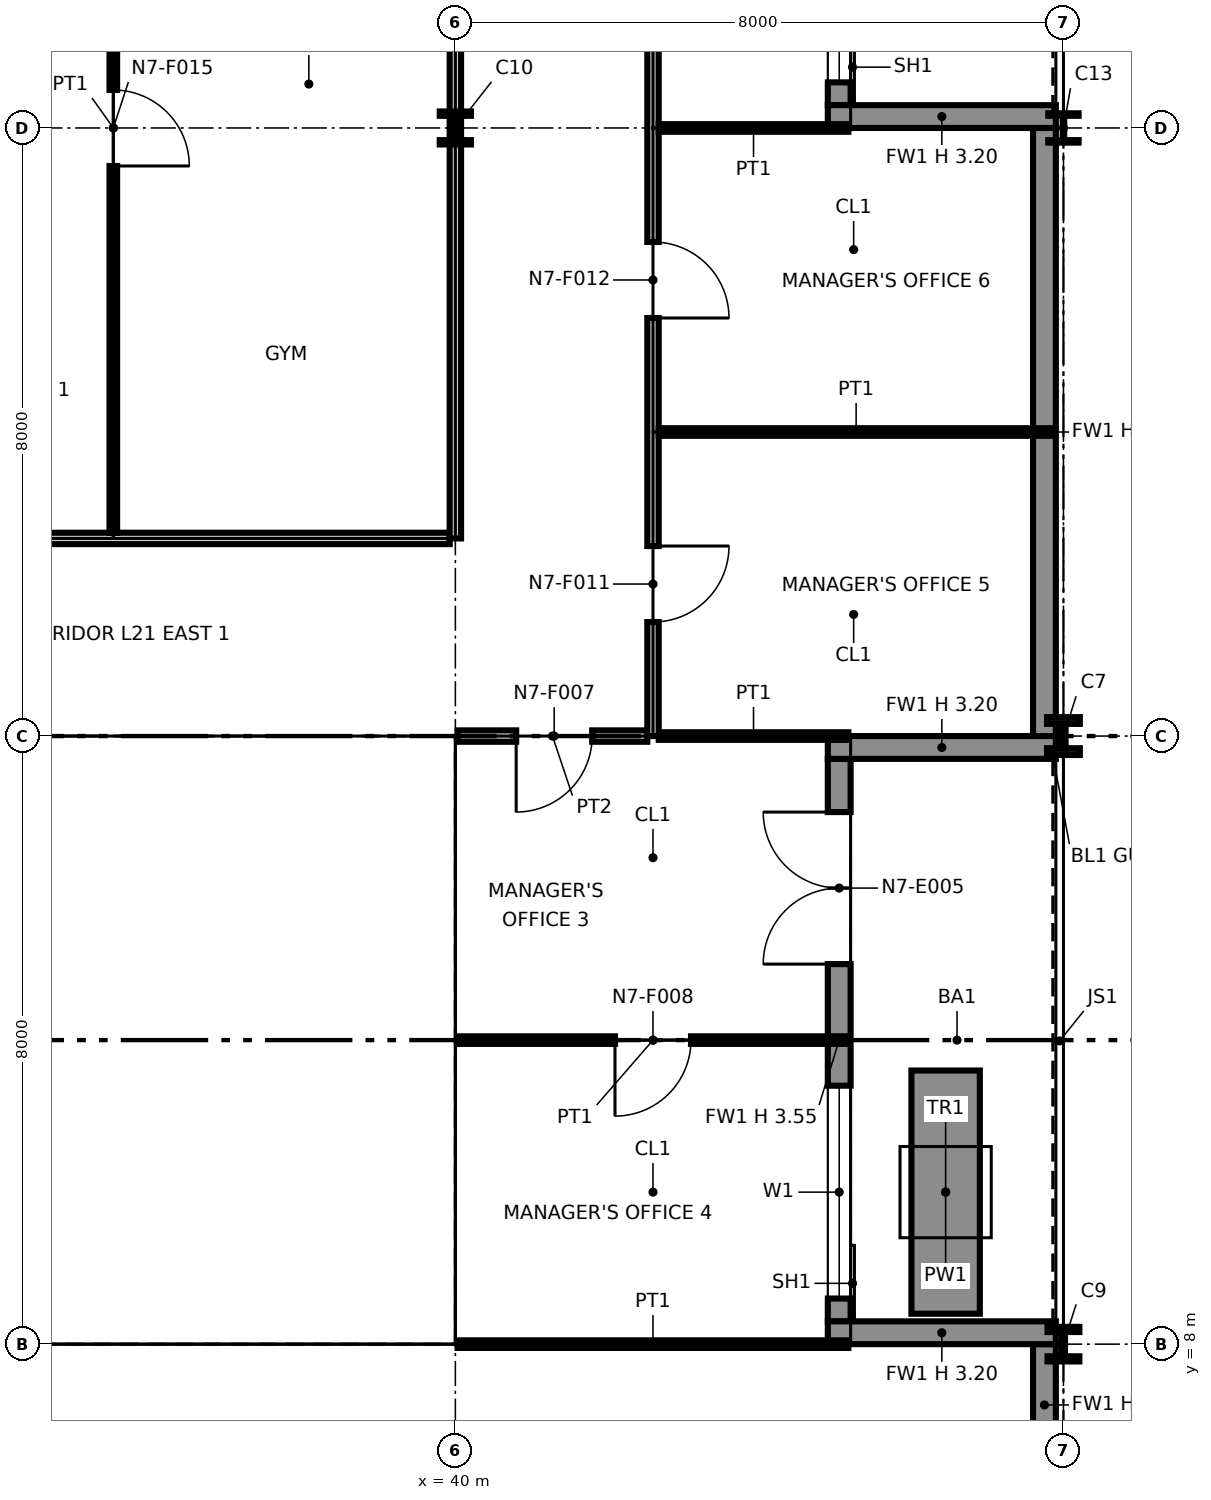
"""IFC4 building model, lengths in metres.
Left out: names, types, materials, properties, quantities, classifications, styles, units other than length and angle.
Written with IfcOpenShell. Run it as: python <this file> out.ifc"""

import sys

from ifc_helpers import new_model, si_unit, direction, frame, frame_2d, origin, origin_2d, place, context, subcontext, project, spatial, polyline, rectangle, i_section, outline, extrude, element, fill, save


model = new_model("IFC4")
c1 = context("Model", 3, precision=1e-05, world=origin(), true_north=direction((0.0, 1.0)))
c2 = subcontext(c1, "Body", "Model", "MODEL_VIEW")
j1 = project(units=[si_unit("LENGTHUNIT", "METRE"), si_unit("PLANEANGLEUNIT", "RADIAN")], contexts=[c1])
p1 = place(None, origin())
s1 = spatial("IfcSite", under=j1, at=p1, CompositionType="ELEMENT")
p2 = place(p1, origin())
s2 = spatial("IfcBuilding", under=s1, at=p2, CompositionType="ELEMENT")
p3 = place(p2, frame((0.0, 0.0, 109.6)))
s3 = spatial("IfcBuildingStorey", under=s2, at=p3, CompositionType="ELEMENT", Elevation=109.6)
for number, where, z_axis, x_axis in (
    (1, (40.0, 8.0, 0.0), (0.0, 0.0, 1.0), (1.0, 0.0, 0.0)),
    (2, (40.0, 16.0, 0.0), (0.0, 0.0, 1.0), (1.0, 0.0, 0.0)),
):
    element("IfcColumn", number, at=place(p3, frame(where, z_axis=z_axis, x_axis=x_axis)), inside=s3, PredefinedType="COLUMN", context=c2, shape_type="SweptSolid", body=[
        extrude(i_section(OverallWidth=0.406, OverallDepth=0.417, WebThickness=0.03, FlangeThickness=0.048, at=origin_2d()), origin(), (0.0, 0.0, 1.0), 4.15),
    ])
p4 = place(p3, frame((40.0, 24.0, 0.0), z_axis=(0.0, 0.0, 1.0), x_axis=(1.0, 0.0, 0.0)))
e3 = element("IfcColumn", 3, at=p4, inside=s3, PredefinedType="COLUMN", context=c2, shape_type="SweptSolid", body=[
    extrude(i_section(OverallWidth=0.411, OverallDepth=0.434, WebThickness=0.036, FlangeThickness=0.057, at=origin_2d()), origin(), (0.0, 0.0, 1.0), 4.15),
])
p5 = place(p3, frame((48.0, 8.0, 0.0), z_axis=(0.0, 0.0, 1.0), x_axis=(1.0, 0.0, 0.0)))
e4 = element("IfcColumn", 4, at=p5, inside=s3, PredefinedType="COLUMN", context=c2, shape_type="SweptSolid", body=[
    extrude(i_section(OverallWidth=0.419, OverallDepth=0.455, WebThickness=0.042, FlangeThickness=0.068, at=origin_2d()), origin(), (0.0, 0.0, 1.0), 4.15),
])
p6 = place(p3, frame((48.0, 16.0, 0.0), z_axis=(0.0, 0.0, 1.0), x_axis=(1.0, 0.0, 0.0)))
e5 = element("IfcColumn", 5, at=p6, inside=s3, PredefinedType="COLUMN", context=c2, shape_type="SweptSolid", body=[
    extrude(i_section(OverallWidth=0.432, OverallDepth=0.498, WebThickness=0.056, FlangeThickness=0.089, at=origin_2d()), origin(), (0.0, 0.0, 1.0), 4.15),
])
p7 = place(p3, frame((48.0, 24.0, 0.0), z_axis=(0.0, 0.0, 1.0), x_axis=(1.0, 0.0, 0.0)))
e6 = element("IfcColumn", 6, at=p7, inside=s3, PredefinedType="COLUMN", context=c2, shape_type="SweptSolid", body=[
    extrude(i_section(OverallWidth=0.399, OverallDepth=0.386, WebThickness=0.021, FlangeThickness=0.033, at=origin_2d()), origin(), (0.0, 0.0, 1.0), 4.15),
])
p8 = place(p3, frame((47.75, 6.4, 0.0), z_axis=(0.0, 0.0, 1.0), x_axis=(0.0, 1.0, 0.0)))
e7 = element("IfcWall", 7, at=p8, inside=s3, PredefinedType="SOLIDWALL", context=c2, shape_type="SweptSolid", body=[
    extrude(rectangle(XDim=1.6, YDim=0.3, at=frame_2d((0.8, 0.0))), origin(), (0.0, 0.0, 1.0), 3.199),
])
p9 = place(p3, frame((45.05, 8.3, 0.0), z_axis=(0.0, 0.0, 1.0), x_axis=(0.0, 1.0, 0.0)))
e8 = element("IfcWall", 8, at=p9, inside=s3, PredefinedType="SOLIDWALL", context=c2, shape_type="SweptSolid", body=[
    extrude(rectangle(XDim=7.4, YDim=0.3, at=frame_2d((3.7, 0.0))), origin(), (0.0, 0.0, 1.0), 3.547),
])
p10 = place(p9, frame((0.3, 0.0, 0.9)))
e9 = element("IfcOpeningElement", 9, at=p10, cuts=e8, PredefinedType="OPENING", context=c2, shape_type="SweptSolid", body=[
    extrude(rectangle(XDim=2.8, YDim=2.2, at=frame_2d((1.4, 1.1))), frame((0.0, 0.16, 0.0), z_axis=(0.0, -1.0, 0.0), x_axis=(1.0, 0.0, 0.0)), (0.0, 0.0, 1.0), 0.32),
])
p11 = place(p9, frame((4.7, 0.0, 0.0)))
e10 = element("IfcOpeningElement", 10, at=p11, cuts=e8, PredefinedType="OPENING", context=c2, shape_type="SweptSolid", body=[
    extrude(rectangle(XDim=2.0, YDim=2.4, at=frame_2d((1.0, 1.2))), frame((0.0, 0.16, 0.0), z_axis=(0.0, -1.0, 0.0), x_axis=(1.0, 0.0, 0.0)), (0.0, 0.0, 1.0), 0.32),
])
for number, where, z_axis, x_axis in (
    (11, (47.9, 8.15, 0.0), (0.0, 0.0, 1.0), (-1.0, 0.0, 0.0)),
    (12, (47.9, 15.85, 0.0), (0.0, 0.0, 1.0), (-1.0, 0.0, 0.0)),
):
    element("IfcWall", number, at=place(p3, frame(where, z_axis=z_axis, x_axis=x_axis)), inside=s3, PredefinedType="SOLIDWALL", context=c2, shape_type="SweptSolid", body=[
        extrude(rectangle(XDim=3.0, YDim=0.3, at=frame_2d((1.5, 0.0))), origin(), (0.0, 0.0, 1.0), 3.199),
    ])
p12 = place(p3, frame((47.75, 16.0, 0.0), z_axis=(0.0, 0.0, 1.0), x_axis=(0.0, 1.0, 0.0)))
e13 = element("IfcWall", 13, at=p12, inside=s3, PredefinedType="SOLIDWALL", context=c2, shape_type="SweptSolid", body=[
    extrude(rectangle(XDim=8.0, YDim=0.3, at=frame_2d((4.0, 0.0))), origin(), (0.0, 0.0, 1.0), 3.199),
])
p13 = place(p3, frame((45.05, 24.3, 0.0), z_axis=(0.0, 0.0, 1.0), x_axis=(0.0, 1.0, 0.0)))
e14 = element("IfcWall", 14, at=p13, inside=s3, PredefinedType="SOLIDWALL", context=c2, shape_type="SweptSolid", body=[
    extrude(rectangle(XDim=7.4, YDim=0.3, at=frame_2d((3.7, 0.0))), origin(), (0.0, 0.0, 1.0), 3.547),
])
p14 = place(p13, frame((0.3, 0.0, 0.9)))
e15 = element("IfcOpeningElement", 15, at=p14, cuts=e14, PredefinedType="OPENING", context=c2, shape_type="SweptSolid", body=[
    extrude(rectangle(XDim=2.8, YDim=2.2, at=frame_2d((1.4, 1.1))), frame((0.0, 0.16, 0.0), z_axis=(0.0, -1.0, 0.0), x_axis=(1.0, 0.0, 0.0)), (0.0, 0.0, 1.0), 0.32),
])
p15 = place(p13, frame((4.7, 0.0, 0.0)))
e16 = element("IfcOpeningElement", 16, at=p15, cuts=e14, PredefinedType="OPENING", context=c2, shape_type="SweptSolid", body=[
    extrude(rectangle(XDim=2.0, YDim=2.4, at=frame_2d((1.0, 1.2))), frame((0.0, 0.16, 0.0), z_axis=(0.0, -1.0, 0.0), x_axis=(1.0, 0.0, 0.0)), (0.0, 0.0, 1.0), 0.32),
])
p16 = place(p3, frame((47.9, 24.15, 0.0), z_axis=(0.0, 0.0, 1.0), x_axis=(-1.0, 0.0, 0.0)))
e17 = element("IfcWall", 17, at=p16, inside=s3, PredefinedType="SOLIDWALL", context=c2, shape_type="SweptSolid", body=[
    extrude(rectangle(XDim=3.0, YDim=0.3, at=frame_2d((1.5, 0.0))), origin(), (0.0, 0.0, 1.0), 3.199),
])
p17 = place(p3, frame((46.45, 8.4, 0.0), z_axis=(0.0, 0.0, 1.0), x_axis=(0.0, 1.0, 0.0)))
e18 = element("IfcWall", 18, at=p17, inside=s3, PredefinedType="SOLIDWALL", context=c2, shape_type="SweptSolid", body=[
    extrude(rectangle(XDim=3.2, YDim=0.9, at=frame_2d((1.6, 0.0))), origin(), (0.0, 0.0, 1.0), 0.6),
])
p18 = place(p3, frame((24.65, 8.75, 0.0), z_axis=(0.0, 0.0, 1.0), x_axis=(1.0, 0.0, 0.0)))
e19 = element("IfcWall", 19, at=p18, inside=s3, PredefinedType="PARTITIONING", context=c2, shape_type="SweptSolid", body=[
    extrude(outline(polyline([(0.0, 0.0), (14.7, 0.0), (14.7, 4.15), (7.489, 4.15), (7.488, 3.382), (7.212, 3.382), (7.211, 4.15), (0.0, 4.15), (0.0, 0.0)])), frame((0.0, 0.1, 0.0), z_axis=(0.0, -1.0, 0.0), x_axis=(1.0, 0.0, 0.0)), (0.0, 0.0, 1.0), 0.2),
])
p19 = place(p3, frame((24.65, 15.25, 0.0), z_axis=(0.0, 0.0, 1.0), x_axis=(1.0, 0.0, 0.0)))
e20 = element("IfcWall", 20, at=p19, inside=s3, PredefinedType="PARTITIONING", context=c2, shape_type="SweptSolid", body=[
    extrude(outline(polyline([(0.0, 0.0), (14.7, 0.0), (14.7, 4.15), (7.489, 4.15), (7.488, 3.382), (7.212, 3.382), (7.211, 4.15), (0.0, 4.15), (0.0, 0.0)])), frame((0.0, 0.1, 0.0), z_axis=(0.0, -1.0, 0.0), x_axis=(1.0, 0.0, 0.0)), (0.0, 0.0, 1.0), 0.2),
])
p20 = place(p19, frame((2.85, 0.0, 0.0)))
e21 = element("IfcOpeningElement", 21, at=p20, cuts=e20, PredefinedType="OPENING", context=c2, shape_type="SweptSolid", body=[
    extrude(rectangle(XDim=1.8, YDim=2.1, at=frame_2d((0.9, 1.05))), frame((0.0, 0.11, 0.0), z_axis=(0.0, -1.0, 0.0), x_axis=(1.0, 0.0, 0.0)), (0.0, 0.0, 1.0), 0.22),
])
p21 = place(p19, frame((9.95, 0.0, 0.0), z_axis=(0.0, 0.0, 1.0), x_axis=(-1.0, 0.0, 0.0)))
e22 = element("IfcOpeningElement", 22, at=p21, cuts=e20, PredefinedType="OPENING", context=c2, shape_type="SweptSolid", body=[
    extrude(rectangle(XDim=1.4, YDim=2.1, at=frame_2d((0.7, 1.05))), frame((0.0, 0.11, 0.0), z_axis=(0.0, -1.0, 0.0), x_axis=(1.0, 0.0, 0.0)), (0.0, 0.0, 1.0), 0.22),
])
p22 = place(p19, frame((13.4, 0.0, 0.0), z_axis=(0.0, 0.0, 1.0), x_axis=(-1.0, 0.0, 0.0)))
e23 = element("IfcOpeningElement", 23, at=p22, cuts=e20, PredefinedType="OPENING", context=c2, shape_type="SweptSolid", body=[
    extrude(rectangle(XDim=1.4, YDim=2.1, at=frame_2d((0.7, 1.05))), frame((0.0, 0.11, 0.0), z_axis=(0.0, -1.0, 0.0), x_axis=(1.0, 0.0, 0.0)), (0.0, 0.0, 1.0), 0.22),
])
for number, where, z_axis, x_axis in (
    (24, (35.6, 8.85, 0.0), (0.0, 0.0, 1.0), (0.0, 1.0, 0.0)),
    (25, (39.25, 8.85, 0.0), (0.0, 0.0, 1.0), (0.0, 1.0, 0.0)),
):
    element("IfcWall", number, at=place(p3, frame(where, z_axis=z_axis, x_axis=x_axis)), inside=s3, PredefinedType="PARTITIONING", context=c2, shape_type="SweptSolid", body=[
        extrude(rectangle(XDim=6.3, YDim=0.2, at=frame_2d((3.15, 0.0))), origin(), (0.0, 0.0, 1.0), 4.15),
    ])
p23 = place(p3, frame((40.03, 8.0, 0.0), z_axis=(0.0, 0.0, 1.0), x_axis=(1.0, 0.0, 0.0)))
e26 = element("IfcWall", 26, at=p23, inside=s3, PredefinedType="PARTITIONING", context=c2, shape_type="SweptSolid", body=[
    extrude(rectangle(XDim=5.14, YDim=0.1, at=frame_2d((2.57, 0.0))), origin(), (0.0, 0.0, 1.0), 3.194),
])
p24 = place(p3, frame((40.03, 12.0, 0.0), z_axis=(0.0, 0.0, 1.0), x_axis=(1.0, 0.0, 0.0)))
e27 = element("IfcWall", 27, at=p24, inside=s3, PredefinedType="PARTITIONING", context=c2, shape_type="SweptSolid", body=[
    extrude(rectangle(XDim=5.14, YDim=0.1, at=frame_2d((2.57, 0.0))), origin(), (0.0, 0.0, 1.0), 3.194),
])
p25 = place(p24, frame((3.07, 0.0, 0.0), z_axis=(0.0, 0.0, 1.0), x_axis=(-1.0, 0.0, 0.0)))
e28 = element("IfcOpeningElement", 28, at=p25, cuts=e27, PredefinedType="OPENING", context=c2, shape_type="SweptSolid", body=[
    extrude(rectangle(XDim=1.0, YDim=2.1, at=frame_2d((0.5, 1.05))), frame((0.0, 0.06, 0.0), z_axis=(0.0, -1.0, 0.0), x_axis=(1.0, 0.0, 0.0)), (0.0, 0.0, 1.0), 0.12),
])
p26 = place(p3, frame((40.03, 16.0, 0.0), z_axis=(0.0, 0.0, 1.0), x_axis=(1.0, 0.0, 0.0)))
e29 = element("IfcWall", 29, at=p26, inside=s3, PredefinedType="PARTITIONING", context=c2, shape_type="SweptSolid", body=[
    extrude(rectangle(XDim=2.495, YDim=0.15, at=frame_2d((1.248, 0.0))), origin(), (0.0, 0.0, 1.0), 3.194),
])
p27 = place(p26, frame((1.77, 0.0, 0.0), z_axis=(0.0, 0.0, 1.0), x_axis=(-1.0, 0.0, 0.0)))
e30 = element("IfcOpeningElement", 30, at=p27, cuts=e29, PredefinedType="OPENING", context=c2, shape_type="SweptSolid", body=[
    extrude(rectangle(XDim=1.0, YDim=2.1, at=frame_2d((0.5, 1.05))), frame((0.0, 0.085, 0.0), z_axis=(0.0, -1.0, 0.0), x_axis=(1.0, 0.0, 0.0)), (0.0, 0.0, 1.0), 0.17),
])
p28 = place(p3, frame((42.675, 16.0, 0.0), z_axis=(0.0, 0.0, 1.0), x_axis=(1.0, 0.0, 0.0)))
e31 = element("IfcWall", 31, at=p28, inside=s3, PredefinedType="PARTITIONING", context=c2, shape_type="SweptSolid", body=[
    extrude(rectangle(XDim=2.495, YDim=0.1, at=frame_2d((1.248, 0.0))), origin(), (0.0, 0.0, 1.0), 3.194),
])
p29 = place(p3, frame((42.6, 16.0, 0.0), z_axis=(0.0, 0.0, 1.0), x_axis=(0.0, 1.0, 0.0)))
e32 = element("IfcWall", 32, at=p29, inside=s3, PredefinedType="PARTITIONING", context=c2, shape_type="SweptSolid", body=[
    extrude(rectangle(XDim=26.525, YDim=0.15, at=frame_2d((13.262, 0.0))), origin(), (0.0, 0.0, 1.0), 3.194),
])
p30 = place(p29, frame((2.5, 0.0, 0.0), z_axis=(0.0, 0.0, 1.0), x_axis=(-1.0, 0.0, 0.0)))
e33 = element("IfcOpeningElement", 33, at=p30, cuts=e32, PredefinedType="OPENING", context=c2, shape_type="SweptSolid", body=[
    extrude(rectangle(XDim=1.0, YDim=2.1, at=frame_2d((0.5, 1.05))), frame((0.0, 0.085, 0.0), z_axis=(0.0, -1.0, 0.0), x_axis=(1.0, 0.0, 0.0)), (0.0, 0.0, 1.0), 0.17),
])
p31 = place(p29, frame((6.5, 0.0, 0.0), z_axis=(0.0, 0.0, 1.0), x_axis=(-1.0, 0.0, 0.0)))
e34 = element("IfcOpeningElement", 34, at=p31, cuts=e32, PredefinedType="OPENING", context=c2, shape_type="SweptSolid", body=[
    extrude(rectangle(XDim=1.0, YDim=2.1, at=frame_2d((0.5, 1.05))), frame((0.0, 0.085, 0.0), z_axis=(0.0, -1.0, 0.0), x_axis=(1.0, 0.0, 0.0)), (0.0, 0.0, 1.0), 0.17),
])
p32 = place(p29, frame((12.5, 0.0, 0.0), z_axis=(0.0, 0.0, 1.0), x_axis=(-1.0, 0.0, 0.0)))
e35 = element("IfcOpeningElement", 35, at=p32, cuts=e32, PredefinedType="OPENING", context=c2, shape_type="SweptSolid", body=[
    extrude(rectangle(XDim=1.0, YDim=2.1, at=frame_2d((0.5, 1.05))), frame((0.0, 0.085, 0.0), z_axis=(0.0, -1.0, 0.0), x_axis=(1.0, 0.0, 0.0)), (0.0, 0.0, 1.0), 0.17),
])
p33 = place(p29, frame((18.5, 0.0, 0.0), z_axis=(0.0, 0.0, 1.0), x_axis=(-1.0, 0.0, 0.0)))
e36 = element("IfcOpeningElement", 36, at=p33, cuts=e32, PredefinedType="OPENING", context=c2, shape_type="SweptSolid", body=[
    extrude(rectangle(XDim=1.0, YDim=2.1, at=frame_2d((0.5, 1.05))), frame((0.0, 0.085, 0.0), z_axis=(0.0, -1.0, 0.0), x_axis=(1.0, 0.0, 0.0)), (0.0, 0.0, 1.0), 0.17),
])
p34 = place(p29, frame((22.5, 0.0, 0.0), z_axis=(0.0, 0.0, 1.0), x_axis=(-1.0, 0.0, 0.0)))
e37 = element("IfcOpeningElement", 37, at=p34, cuts=e32, PredefinedType="OPENING", context=c2, shape_type="SweptSolid", body=[
    extrude(rectangle(XDim=1.0, YDim=2.1, at=frame_2d((0.5, 1.05))), frame((0.0, 0.085, 0.0), z_axis=(0.0, -1.0, 0.0), x_axis=(1.0, 0.0, 0.0)), (0.0, 0.0, 1.0), 0.17),
])
p35 = place(p29, frame((25.8, 0.0, 0.0), z_axis=(0.0, 0.0, 1.0), x_axis=(-1.0, 0.0, 0.0)))
e38 = element("IfcOpeningElement", 38, at=p35, cuts=e32, PredefinedType="OPENING", context=c2, shape_type="SweptSolid", body=[
    extrude(rectangle(XDim=1.0, YDim=2.1, at=frame_2d((0.5, 1.05))), frame((0.0, 0.085, 0.0), z_axis=(0.0, -1.0, 0.0), x_axis=(1.0, 0.0, 0.0)), (0.0, 0.0, 1.0), 0.17),
])
p36 = place(p3, frame((26.675, 18.6, 0.0), z_axis=(0.0, 0.0, 1.0), x_axis=(1.0, 0.0, 0.0)))
e39 = element("IfcWall", 39, at=p36, inside=s3, PredefinedType="PARTITIONING", context=c2, shape_type="SweptSolid", body=[
    extrude(rectangle(XDim=13.25, YDim=0.15, at=frame_2d((6.625, 0.0))), origin(), (0.0, 0.0, 1.0), 3.194),
])
p37 = place(p36, frame((2.325, 0.0, 0.0)))
e40 = element("IfcOpeningElement", 40, at=p37, cuts=e39, PredefinedType="OPENING", context=c2, shape_type="SweptSolid", body=[
    extrude(rectangle(XDim=1.0, YDim=2.1, at=frame_2d((0.5, 1.05))), frame((0.0, 0.085, 0.0), z_axis=(0.0, -1.0, 0.0), x_axis=(1.0, 0.0, 0.0)), (0.0, 0.0, 1.0), 0.17),
])
p38 = place(p3, frame((35.5, 18.675, 0.0), z_axis=(0.0, 0.0, 1.0), x_axis=(0.0, 1.0, 0.0)))
e41 = element("IfcWall", 41, at=p38, inside=s3, PredefinedType="PARTITIONING", context=c2, shape_type="SweptSolid", body=[
    extrude(rectangle(XDim=10.65, YDim=0.1, at=frame_2d((5.325, 0.0))), origin(), (0.0, 0.0, 1.0), 3.194),
])
p39 = place(p38, frame((5.825, 0.0, 0.0), z_axis=(0.0, 0.0, 1.0), x_axis=(-1.0, 0.0, 0.0)))
e42 = element("IfcOpeningElement", 42, at=p39, cuts=e41, PredefinedType="OPENING", context=c2, shape_type="SweptSolid", body=[
    extrude(rectangle(XDim=1.0, YDim=2.1, at=frame_2d((0.5, 1.05))), frame((0.0, 0.06, 0.0), z_axis=(0.0, -1.0, 0.0), x_axis=(1.0, 0.0, 0.0)), (0.0, 0.0, 1.0), 0.12),
])
p40 = place(p3, frame((40.0, 18.6, 0.0), z_axis=(0.0, 0.0, 1.0), x_axis=(0.0, 1.0, 0.0)))
e43 = element("IfcWall", 43, at=p40, inside=s3, PredefinedType="PARTITIONING", context=c2, shape_type="SweptSolid", body=[
    extrude(rectangle(XDim=13.37, YDim=0.15, at=frame_2d((6.685, 0.0))), origin(), (0.0, 0.0, 1.0), 3.194),
])
p41 = place(p40, frame((8.9, 0.0, 0.0)))
e44 = element("IfcOpeningElement", 44, at=p41, cuts=e43, PredefinedType="OPENING", context=c2, shape_type="SweptSolid", body=[
    extrude(rectangle(XDim=1.0, YDim=2.1, at=frame_2d((0.5, 1.05))), frame((0.0, 0.085, 0.0), z_axis=(0.0, -1.0, 0.0), x_axis=(1.0, 0.0, 0.0)), (0.0, 0.0, 1.0), 0.17),
])
p42 = place(p3, frame((42.675, 20.0, 0.0), z_axis=(0.0, 0.0, 1.0), x_axis=(1.0, 0.0, 0.0)))
e45 = element("IfcWall", 45, at=p42, inside=s3, PredefinedType="PARTITIONING", context=c2, shape_type="SweptSolid", body=[
    extrude(rectangle(XDim=5.195, YDim=0.1, at=frame_2d((2.598, 0.0))), origin(), (0.0, 0.0, 1.0), 3.194),
])
p43 = place(p3, frame((42.675, 24.0, 0.0), z_axis=(0.0, 0.0, 1.0), x_axis=(1.0, 0.0, 0.0)))
e46 = element("IfcWall", 46, at=p43, inside=s3, PredefinedType="PARTITIONING", context=c2, shape_type="SweptSolid", body=[
    extrude(rectangle(XDim=2.495, YDim=0.1, at=frame_2d((1.248, 0.0))), origin(), (0.0, 0.0, 1.0), 3.194),
])
p44 = place(p10, origin())
e47 = element("IfcWindow", 47, at=p44, inside=s3, PartitioningType="SINGLE_PANEL", PredefinedType="WINDOW", context=c2, shape_type="SweptSolid", body=[
    extrude(rectangle(XDim=2.8, YDim=2.2, at=frame_2d((1.4, 1.1))), frame((0.0, 0.03, 0.0), z_axis=(0.0, -1.0, 0.0), x_axis=(1.0, 0.0, 0.0)), (0.0, 0.0, 1.0), 0.06),
])
fill(e9, e47)
p45 = place(p11, origin())
e48 = element("IfcDoor", 48, at=p45, inside=s3, OperationType="DOUBLE_DOOR_SINGLE_SWING", PredefinedType="DOOR", context=c2, shape_type="SweptSolid", body=[
    extrude(rectangle(XDim=2.0, YDim=2.4, at=frame_2d((1.0, 1.2))), frame((0.0, 0.025, 0.0), z_axis=(0.0, -1.0, 0.0), x_axis=(1.0, 0.0, 0.0)), (0.0, 0.0, 1.0), 0.05),
])
fill(e10, e48)
p46 = place(p14, origin())
e49 = element("IfcWindow", 49, at=p46, inside=s3, PartitioningType="SINGLE_PANEL", PredefinedType="WINDOW", context=c2, shape_type="SweptSolid", body=[
    extrude(rectangle(XDim=2.8, YDim=2.2, at=frame_2d((1.4, 1.1))), frame((0.0, 0.03, 0.0), z_axis=(0.0, -1.0, 0.0), x_axis=(1.0, 0.0, 0.0)), (0.0, 0.0, 1.0), 0.06),
])
fill(e15, e49)
p47 = place(p22, origin())
e50 = element("IfcDoor", 50, at=p47, inside=s3, OperationType="DOUBLE_DOOR_SINGLE_SWING", PredefinedType="NOTDEFINED", context=c2, shape_type="SweptSolid", body=[
    extrude(rectangle(XDim=1.4, YDim=2.1, at=frame_2d((0.7, 1.05))), frame((0.0, 0.025, 0.0), z_axis=(0.0, -1.0, 0.0), x_axis=(1.0, 0.0, 0.0)), (0.0, 0.0, 1.0), 0.05),
])
fill(e23, e50)
p48 = place(p27, origin())
e51 = element("IfcDoor", 51, at=p48, inside=s3, OperationType="SINGLE_SWING_RIGHT", PredefinedType="DOOR", context=c2, shape_type="SweptSolid", body=[
    extrude(rectangle(XDim=1.0, YDim=2.1, at=frame_2d((0.5, 1.05))), frame((0.0, 0.025, 0.0), z_axis=(0.0, -1.0, 0.0), x_axis=(1.0, 0.0, 0.0)), (0.0, 0.0, 1.0), 0.05),
])
fill(e30, e51)
p49 = place(p25, origin())
e52 = element("IfcDoor", 52, at=p49, inside=s3, OperationType="SINGLE_SWING_RIGHT", PredefinedType="DOOR", context=c2, shape_type="SweptSolid", body=[
    extrude(rectangle(XDim=1.0, YDim=2.1, at=frame_2d((0.5, 1.05))), frame((0.0, 0.025, 0.0), z_axis=(0.0, -1.0, 0.0), x_axis=(1.0, 0.0, 0.0)), (0.0, 0.0, 1.0), 0.05),
])
fill(e28, e52)
p50 = place(p30, origin())
e53 = element("IfcDoor", 53, at=p50, inside=s3, OperationType="SINGLE_SWING_LEFT", PredefinedType="DOOR", context=c2, shape_type="SweptSolid", body=[
    extrude(rectangle(XDim=1.0, YDim=2.1, at=frame_2d((0.5, 1.05))), frame((0.0, 0.025, 0.0), z_axis=(0.0, -1.0, 0.0), x_axis=(1.0, 0.0, 0.0)), (0.0, 0.0, 1.0), 0.05),
])
fill(e33, e53)
p51 = place(p31, origin())
e54 = element("IfcDoor", 54, at=p51, inside=s3, OperationType="SINGLE_SWING_RIGHT", PredefinedType="DOOR", context=c2, shape_type="SweptSolid", body=[
    extrude(rectangle(XDim=1.0, YDim=2.1, at=frame_2d((0.5, 1.05))), frame((0.0, 0.025, 0.0), z_axis=(0.0, -1.0, 0.0), x_axis=(1.0, 0.0, 0.0)), (0.0, 0.0, 1.0), 0.05),
])
fill(e34, e54)
p52 = place(p39, origin())
e55 = element("IfcDoor", 55, at=p52, inside=s3, OperationType="SINGLE_SWING_RIGHT", PredefinedType="DOOR", context=c2, shape_type="SweptSolid", body=[
    extrude(rectangle(XDim=1.0, YDim=2.1, at=frame_2d((0.5, 1.05))), frame((0.0, 0.025, 0.0), z_axis=(0.0, -1.0, 0.0), x_axis=(1.0, 0.0, 0.0)), (0.0, 0.0, 1.0), 0.05),
])
fill(e42, e55)
save(model, sys.argv[1])
